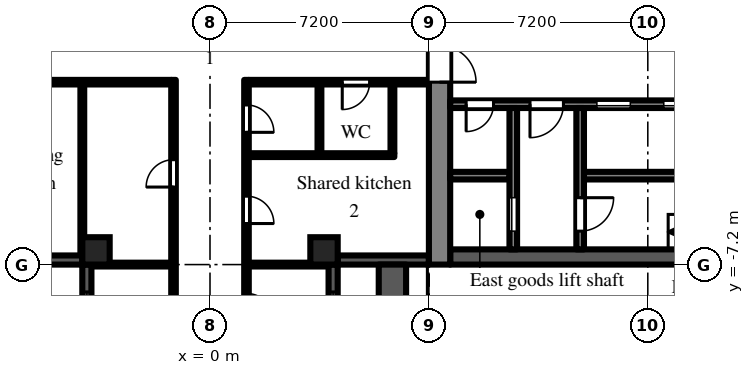
"""IFC4 building model, lengths in metres.
Left out: names, types, materials, properties, quantities, classifications, styles, units other than length and angle.
Written with IfcOpenShell. Run it as: python <this file> out.ifc"""

import sys

from ifc_helpers import new_model, si_unit, direction, frame, frame_2d, origin, origin_2d, place, context, subcontext, project, spatial, rectangle, extrude, element, fill, save


model = new_model("IFC4")
c1 = context("Model", 3, precision=1e-05, world=origin(), true_north=direction((0.0, 1.0)))
c2 = subcontext(c1, "Body", "Model", "MODEL_VIEW")
j1 = project(units=[si_unit("LENGTHUNIT", "METRE"), si_unit("PLANEANGLEUNIT", "RADIAN")], contexts=[c1])
p1 = place(None, origin())
s1 = spatial("IfcSite", under=j1, at=p1, CompositionType="ELEMENT")
p2 = place(p1, origin())
s2 = spatial("IfcBuilding", under=s1, at=p2, CompositionType="ELEMENT")
p3 = place(p2, frame((0.0, 0.0, 11.7)))
s3 = spatial("IfcBuildingStorey", under=s2, at=p3, CompositionType="ELEMENT", Elevation=11.7)
for number, where, z_axis, x_axis in (
    (1, (-3.75, -6.75, 0.0), (0.0, 0.0, 1.0), (1.0, 0.0, 0.0)),
    (2, (3.75, -6.75, 0.0), (0.0, 0.0, 1.0), (1.0, 0.0, 0.0)),
):
    element("IfcColumn", number, at=place(p3, frame(where, z_axis=z_axis, x_axis=x_axis)), inside=s3, PredefinedType="COLUMN", context=c2, shape_type="SweptSolid", body=[
        extrude(rectangle(XDim=0.9, YDim=0.9, at=origin_2d()), origin(), (0.0, 0.0, 1.0), 3.0),
    ])
p4 = place(p3, frame((-7.2, -7.05, 0.0), z_axis=(0.0, 0.0, 1.0), x_axis=(1.0, 0.0, 0.0)))
e3 = element("IfcWall", 3, at=p4, inside=s3, PredefinedType="SOLIDWALL", context=c2, shape_type="SweptSolid", body=[
    extrude(rectangle(XDim=3.0, YDim=0.3, at=frame_2d((1.5, 0.0))), origin(), (0.0, 0.0, 1.0), 2.1),
])
p5 = place(p3, frame((-4.05, -7.2, 0.0), z_axis=(0.0, 0.0, 1.0), x_axis=(0.0, -1.0, 0.0)))
e4 = element("IfcWall", 4, at=p5, inside=s3, PredefinedType="SOLIDWALL", context=c2, shape_type="SweptSolid", body=[
    extrude(rectangle(XDim=7.2, YDim=0.3, at=frame_2d((3.6, 0.0))), origin(), (0.0, 0.0, 1.0), 2.1),
])
p6 = place(p5, frame((3.0, 0.0, 0.0)))
e5 = element("IfcOpeningElement", 5, at=p6, cuts=e4, PredefinedType="OPENING", context=c2, shape_type="SweptSolid", body=[
    extrude(rectangle(XDim=1.2, YDim=2.05, at=frame_2d((0.6, 1.025))), frame((0.0, 0.16, 0.0), z_axis=(0.0, -1.0, 0.0), x_axis=(1.0, 0.0, 0.0)), (0.0, 0.0, 1.0), 0.32),
])
p7 = place(p5, frame((0.9, 0.0, 0.2)))
e6 = element("IfcOpeningElement", 6, at=p7, cuts=e4, PredefinedType="OPENING", context=c2, shape_type="SweptSolid", body=[
    extrude(rectangle(XDim=1.8, YDim=1.85, at=frame_2d((0.9, 0.925))), frame((0.0, 0.16, 0.0), z_axis=(0.0, -1.0, 0.0), x_axis=(1.0, 0.0, 0.0)), (0.0, 0.0, 1.0), 0.32),
])
p8 = place(p5, frame((4.5, 0.0, 0.2)))
e7 = element("IfcOpeningElement", 7, at=p8, cuts=e4, PredefinedType="OPENING", context=c2, shape_type="SweptSolid", body=[
    extrude(rectangle(XDim=1.8, YDim=1.85, at=frame_2d((0.9, 0.925))), frame((0.0, 0.16, 0.0), z_axis=(0.0, -1.0, 0.0), x_axis=(1.0, 0.0, 0.0)), (0.0, 0.0, 1.0), 0.32),
])
p9 = place(p3, frame((4.05, -14.4, 0.0), z_axis=(0.0, 0.0, 1.0), x_axis=(0.0, 1.0, 0.0)))
e8 = element("IfcWall", 8, at=p9, inside=s3, PredefinedType="SOLIDWALL", context=c2, shape_type="SweptSolid", body=[
    extrude(rectangle(XDim=7.2, YDim=0.3, at=frame_2d((3.6, 0.0))), origin(), (0.0, 0.0, 1.0), 2.1),
])
p10 = place(p9, frame((3.0, 0.0, 0.0)))
e9 = element("IfcOpeningElement", 9, at=p10, cuts=e8, PredefinedType="OPENING", context=c2, shape_type="SweptSolid", body=[
    extrude(rectangle(XDim=1.2, YDim=2.05, at=frame_2d((0.6, 1.025))), frame((0.0, 0.16, 0.0), z_axis=(0.0, -1.0, 0.0), x_axis=(1.0, 0.0, 0.0)), (0.0, 0.0, 1.0), 0.32),
])
p11 = place(p9, frame((0.9, 0.0, 0.2)))
e10 = element("IfcOpeningElement", 10, at=p11, cuts=e8, PredefinedType="OPENING", context=c2, shape_type="SweptSolid", body=[
    extrude(rectangle(XDim=1.8, YDim=1.85, at=frame_2d((0.9, 0.925))), frame((0.0, 0.16, 0.0), z_axis=(0.0, -1.0, 0.0), x_axis=(1.0, 0.0, 0.0)), (0.0, 0.0, 1.0), 0.32),
])
p12 = place(p9, frame((4.5, 0.0, 0.2)))
e11 = element("IfcOpeningElement", 11, at=p12, cuts=e8, PredefinedType="OPENING", context=c2, shape_type="SweptSolid", body=[
    extrude(rectangle(XDim=1.8, YDim=1.85, at=frame_2d((0.9, 0.925))), frame((0.0, 0.16, 0.0), z_axis=(0.0, -1.0, 0.0), x_axis=(1.0, 0.0, 0.0)), (0.0, 0.0, 1.0), 0.32),
])
p13 = place(p3, frame((4.2, -7.05, 0.0), z_axis=(0.0, 0.0, 1.0), x_axis=(1.0, 0.0, 0.0)))
e12 = element("IfcWall", 12, at=p13, inside=s3, PredefinedType="SOLIDWALL", context=c2, shape_type="SweptSolid", body=[
    extrude(rectangle(XDim=3.0, YDim=0.3, at=frame_2d((1.5, 0.0))), origin(), (0.0, 0.0, 1.0), 2.1),
])
p14 = place(p3, frame((6.0, -14.4, 0.0), z_axis=(0.0, 0.0, 1.0), x_axis=(0.0, 1.0, 0.0)))
e13 = element("IfcWall", 13, at=p14, inside=s3, PredefinedType="PARAPET", context=c2, shape_type="SweptSolid", body=[
    extrude(rectangle(XDim=7.2, YDim=0.9, at=frame_2d((3.6, 0.0))), origin(), (0.0, 0.0, 1.0), 0.8),
])
p15 = place(p3, frame((7.55, -7.2, 0.0), z_axis=(0.0, 0.0, 1.0), x_axis=(0.0, 1.0, 0.0)))
e14 = element("IfcWall", 14, at=p15, inside=s3, PredefinedType="SHEAR", context=c2, shape_type="SweptSolid", body=[
    extrude(rectangle(XDim=14.4, YDim=0.7, at=frame_2d((7.2, 0.0))), origin(), (0.0, 0.0, 1.0), 2.575),
])
p16 = place(p15, frame((6.0, 0.0, 0.0)))
e15 = element("IfcOpeningElement", 15, at=p16, cuts=e14, PredefinedType="OPENING", context=c2, shape_type="SweptSolid", body=[
    extrude(rectangle(XDim=2.4, YDim=2.2, at=frame_2d((1.2, 1.1))), frame((0.0, 0.36, 0.0), z_axis=(0.0, -1.0, 0.0), x_axis=(1.0, 0.0, 0.0)), (0.0, 0.0, 1.0), 0.72),
])
p17 = place(p3, frame((7.9, -6.95, 0.0), z_axis=(0.0, 0.0, 1.0), x_axis=(1.0, 0.0, 0.0)))
e16 = element("IfcWall", 16, at=p17, inside=s3, PredefinedType="SHEAR", context=c2, shape_type="SweptSolid", body=[
    extrude(rectangle(XDim=12.95, YDim=0.5, at=frame_2d((6.475, 0.0))), origin(), (0.0, 0.0, 1.0), 2.575),
])
p18 = place(p3, frame((7.9, -1.925, 0.0), z_axis=(0.0, 0.0, 1.0), x_axis=(1.0, 0.0, 0.0)))
e17 = element("IfcWall", 17, at=p18, inside=s3, PredefinedType="SHEAR", context=c2, shape_type="SweptSolid", body=[
    extrude(rectangle(XDim=12.95, YDim=0.25, at=frame_2d((6.475, 0.0))), origin(), (0.0, 0.0, 1.0), 2.575),
])
p19 = place(p18, frame((4.825, 0.0, 0.0)))
e18 = element("IfcOpeningElement", 18, at=p19, cuts=e17, PredefinedType="OPENING", context=c2, shape_type="SweptSolid", body=[
    extrude(rectangle(XDim=1.1, YDim=2.1, at=frame_2d((0.55, 1.05))), frame((0.0, 0.135, 0.0), z_axis=(0.0, -1.0, 0.0), x_axis=(1.0, 0.0, 0.0)), (0.0, 0.0, 1.0), 0.27),
])
p20 = place(p18, frame((7.025, 0.0, 0.0)))
e19 = element("IfcOpeningElement", 19, at=p20, cuts=e17, PredefinedType="OPENING", context=c2, shape_type="SweptSolid", body=[
    extrude(rectangle(XDim=1.1, YDim=2.1, at=frame_2d((0.55, 1.05))), frame((0.0, 0.135, 0.0), z_axis=(0.0, -1.0, 0.0), x_axis=(1.0, 0.0, 0.0)), (0.0, 0.0, 1.0), 0.27),
])
p21 = place(p18, frame((9.225, 0.0, 0.0)))
e20 = element("IfcOpeningElement", 20, at=p21, cuts=e17, PredefinedType="OPENING", context=c2, shape_type="SweptSolid", body=[
    extrude(rectangle(XDim=1.1, YDim=2.1, at=frame_2d((0.55, 1.05))), frame((0.0, 0.135, 0.0), z_axis=(0.0, -1.0, 0.0), x_axis=(1.0, 0.0, 0.0)), (0.0, 0.0, 1.0), 0.27),
])
p22 = place(p18, frame((0.525, 0.0, 0.0)))
e21 = element("IfcOpeningElement", 21, at=p22, cuts=e17, PredefinedType="OPENING", context=c2, shape_type="SweptSolid", body=[
    extrude(rectangle(XDim=0.9, YDim=2.1, at=frame_2d((0.45, 1.05))), frame((0.0, 0.135, 0.0), z_axis=(0.0, -1.0, 0.0), x_axis=(1.0, 0.0, 0.0)), (0.0, 0.0, 1.0), 0.27),
])
p23 = place(p18, frame((2.625, 0.0, 0.0)))
e22 = element("IfcOpeningElement", 22, at=p23, cuts=e17, PredefinedType="OPENING", context=c2, shape_type="SweptSolid", body=[
    extrude(rectangle(XDim=1.1, YDim=2.1, at=frame_2d((0.55, 1.05))), frame((0.0, 0.135, 0.0), z_axis=(0.0, -1.0, 0.0), x_axis=(1.0, 0.0, 0.0)), (0.0, 0.0, 1.0), 0.27),
])
p24 = place(p3, frame((7.9, -4.275, 0.0), z_axis=(0.0, 0.0, 1.0), x_axis=(1.0, 0.0, 0.0)))
e23 = element("IfcWall", 23, at=p24, inside=s3, PredefinedType="SHEAR", context=c2, shape_type="SweptSolid", body=[
    extrude(rectangle(XDim=1.95, YDim=0.25, at=frame_2d((0.975, 0.0))), origin(), (0.0, 0.0, 1.0), 2.575),
])
p25 = place(p3, frame((12.3, -4.275, 0.0), z_axis=(0.0, 0.0, 1.0), x_axis=(1.0, 0.0, 0.0)))
e24 = element("IfcWall", 24, at=p25, inside=s3, PredefinedType="SHEAR", context=c2, shape_type="SweptSolid", body=[
    extrude(rectangle(XDim=8.55, YDim=0.25, at=frame_2d((4.275, 0.0))), origin(), (0.0, 0.0, 1.0), 2.575),
])
p26 = place(p3, frame((9.975, -2.05, 0.0), z_axis=(0.0, 0.0, 1.0), x_axis=(0.0, -1.0, 0.0)))
e25 = element("IfcWall", 25, at=p26, inside=s3, PredefinedType="SHEAR", context=c2, shape_type="SweptSolid", body=[
    extrude(rectangle(XDim=4.65, YDim=0.25, at=frame_2d((2.325, 0.0))), origin(), (0.0, 0.0, 1.0), 2.575),
])
p27 = place(p26, frame((2.95, 0.0, 0.0)))
e26 = element("IfcOpeningElement", 26, at=p27, cuts=e25, PredefinedType="OPENING", context=c2, shape_type="SweptSolid", body=[
    extrude(rectangle(XDim=1.1, YDim=2.1, at=frame_2d((0.55, 1.05))), frame((0.0, 0.135, 0.0), z_axis=(0.0, -1.0, 0.0), x_axis=(1.0, 0.0, 0.0)), (0.0, 0.0, 1.0), 0.27),
])
p28 = place(p3, frame((12.175, -2.05, 0.0), z_axis=(0.0, 0.0, 1.0), x_axis=(0.0, -1.0, 0.0)))
e27 = element("IfcWall", 27, at=p28, inside=s3, PredefinedType="SHEAR", context=c2, shape_type="SweptSolid", body=[
    extrude(rectangle(XDim=4.65, YDim=0.25, at=frame_2d((2.325, 0.0))), origin(), (0.0, 0.0, 1.0), 2.575),
])
p29 = place(p28, frame((2.95, 0.0, 0.0)))
e28 = element("IfcOpeningElement", 28, at=p29, cuts=e27, PredefinedType="OPENING", context=c2, shape_type="SweptSolid", body=[
    extrude(rectangle(XDim=1.1, YDim=2.1, at=frame_2d((0.55, 1.05))), frame((0.0, 0.135, 0.0), z_axis=(0.0, -1.0, 0.0), x_axis=(1.0, 0.0, 0.0)), (0.0, 0.0, 1.0), 0.27),
])
p30 = place(p3, frame((-7.2, -1.2, 0.0), z_axis=(0.0, 0.0, 1.0), x_axis=(1.0, 0.0, 0.0)))
e29 = element("IfcWall", 29, at=p30, inside=s3, PredefinedType="PARTITIONING", context=c2, shape_type="SweptSolid", body=[
    extrude(rectangle(XDim=5.925, YDim=0.15, at=frame_2d((2.962, 0.0))), origin(), (0.0, 0.0, 1.0), 2.575),
])
p31 = place(p30, frame((1.05, 0.0, 0.0)))
e30 = element("IfcOpeningElement", 30, at=p31, cuts=e29, PredefinedType="OPENING", context=c2, shape_type="SweptSolid", body=[
    extrude(rectangle(XDim=0.9, YDim=2.1, at=frame_2d((0.45, 1.05))), frame((0.0, 0.085, 0.0), z_axis=(0.0, -1.0, 0.0), x_axis=(1.0, 0.0, 0.0)), (0.0, 0.0, 1.0), 0.17),
])
p32 = place(p3, frame((-4.2, -6.9, 0.0), z_axis=(0.0, 0.0, 1.0), x_axis=(0.0, 1.0, 0.0)))
e31 = element("IfcWall", 31, at=p32, inside=s3, PredefinedType="PARTITIONING", context=c2, shape_type="SweptSolid", body=[
    extrude(rectangle(XDim=5.625, YDim=0.125, at=frame_2d((2.812, 0.0))), origin(), (0.0, 0.0, 1.0), 2.575),
])
p33 = place(p3, frame((-3.9, -7.2, 0.0), z_axis=(0.0, 0.0, 1.0), x_axis=(1.0, 0.0, 0.0)))
e32 = element("IfcWall", 32, at=p33, inside=s3, PredefinedType="PARTITIONING", context=c2, shape_type="SweptSolid", body=[
    extrude(rectangle(XDim=2.625, YDim=0.125, at=frame_2d((1.312, 0.0))), origin(), (0.0, 0.0, 1.0), 2.575),
])
p34 = place(p3, frame((-1.2, -36.5, 0.0), z_axis=(0.0, 0.0, 1.0), x_axis=(0.0, 1.0, 0.0)))
e33 = element("IfcWall", 33, at=p34, inside=s3, PredefinedType="PARTITIONING", context=c2, shape_type="SweptSolid", body=[
    extrude(rectangle(XDim=35.375, YDim=0.15, at=frame_2d((17.688, 0.0))), origin(), (0.0, 0.0, 1.0), 2.575),
])
p35 = place(p34, frame((31.85, 0.0, 0.0)))
e34 = element("IfcOpeningElement", 34, at=p35, cuts=e33, PredefinedType="OPENING", context=c2, shape_type="SweptSolid", body=[
    extrude(rectangle(XDim=0.9, YDim=2.1, at=frame_2d((0.45, 1.05))), frame((0.0, 0.085, 0.0), z_axis=(0.0, -1.0, 0.0), x_axis=(1.0, 0.0, 0.0)), (0.0, 0.0, 1.0), 0.17),
])
p36 = place(p34, frame((27.05, 0.0, 0.0)))
e35 = element("IfcOpeningElement", 35, at=p36, cuts=e33, PredefinedType="OPENING", context=c2, shape_type="SweptSolid", body=[
    extrude(rectangle(XDim=0.9, YDim=2.1, at=frame_2d((0.45, 1.05))), frame((0.0, 0.085, 0.0), z_axis=(0.0, -1.0, 0.0), x_axis=(1.0, 0.0, 0.0)), (0.0, 0.0, 1.0), 0.17),
])
p37 = place(p34, frame((1.55, 0.0, 0.0)))
e36 = element("IfcOpeningElement", 36, at=p37, cuts=e33, PredefinedType="OPENING", context=c2, shape_type="SweptSolid", body=[
    extrude(rectangle(XDim=1.0, YDim=2.1, at=frame_2d((0.5, 1.05))), frame((0.0, 0.085, 0.0), z_axis=(0.0, -1.0, 0.0), x_axis=(1.0, 0.0, 0.0)), (0.0, 0.0, 1.0), 0.17),
])
p38 = place(p3, frame((1.2, -36.5, 0.0), z_axis=(0.0, 0.0, 1.0), x_axis=(0.0, 1.0, 0.0)))
e37 = element("IfcWall", 37, at=p38, inside=s3, PredefinedType="PARTITIONING", context=c2, shape_type="SweptSolid", body=[
    extrude(rectangle(XDim=35.375, YDim=0.15, at=frame_2d((17.688, 0.0))), origin(), (0.0, 0.0, 1.0), 2.575),
])
p39 = place(p38, frame((33.65, 0.0, 0.0)))
e38 = element("IfcOpeningElement", 38, at=p39, cuts=e37, PredefinedType="OPENING", context=c2, shape_type="SweptSolid", body=[
    extrude(rectangle(XDim=0.9, YDim=2.1, at=frame_2d((0.45, 1.05))), frame((0.0, 0.085, 0.0), z_axis=(0.0, -1.0, 0.0), x_axis=(1.0, 0.0, 0.0)), (0.0, 0.0, 1.0), 0.17),
])
p40 = place(p38, frame((30.65, 0.0, 0.0)))
e39 = element("IfcOpeningElement", 39, at=p40, cuts=e37, PredefinedType="OPENING", context=c2, shape_type="SweptSolid", body=[
    extrude(rectangle(XDim=0.9, YDim=2.1, at=frame_2d((0.45, 1.05))), frame((0.0, 0.085, 0.0), z_axis=(0.0, -1.0, 0.0), x_axis=(1.0, 0.0, 0.0)), (0.0, 0.0, 1.0), 0.17),
])
p41 = place(p38, frame((27.45, 0.0, 0.0)))
e40 = element("IfcOpeningElement", 40, at=p41, cuts=e37, PredefinedType="OPENING", context=c2, shape_type="SweptSolid", body=[
    extrude(rectangle(XDim=0.9, YDim=2.1, at=frame_2d((0.45, 1.05))), frame((0.0, 0.085, 0.0), z_axis=(0.0, -1.0, 0.0), x_axis=(1.0, 0.0, 0.0)), (0.0, 0.0, 1.0), 0.17),
])
p42 = place(p38, frame((23.85, 0.0, 0.0)))
e41 = element("IfcOpeningElement", 41, at=p42, cuts=e37, PredefinedType="OPENING", context=c2, shape_type="SweptSolid", body=[
    extrude(rectangle(XDim=0.9, YDim=2.1, at=frame_2d((0.45, 1.05))), frame((0.0, 0.085, 0.0), z_axis=(0.0, -1.0, 0.0), x_axis=(1.0, 0.0, 0.0)), (0.0, 0.0, 1.0), 0.17),
])
p43 = place(p38, frame((19.85, 0.0, 0.0)))
e42 = element("IfcOpeningElement", 42, at=p43, cuts=e37, PredefinedType="OPENING", context=c2, shape_type="SweptSolid", body=[
    extrude(rectangle(XDim=0.9, YDim=2.1, at=frame_2d((0.45, 1.05))), frame((0.0, 0.085, 0.0), z_axis=(0.0, -1.0, 0.0), x_axis=(1.0, 0.0, 0.0)), (0.0, 0.0, 1.0), 0.17),
])
p44 = place(p38, frame((1.55, 0.0, 0.0)))
e43 = element("IfcOpeningElement", 43, at=p44, cuts=e37, PredefinedType="OPENING", context=c2, shape_type="SweptSolid", body=[
    extrude(rectangle(XDim=1.0, YDim=2.1, at=frame_2d((0.5, 1.05))), frame((0.0, 0.085, 0.0), z_axis=(0.0, -1.0, 0.0), x_axis=(1.0, 0.0, 0.0)), (0.0, 0.0, 1.0), 0.17),
])
p45 = place(p3, frame((1.275, -7.2, 0.0), z_axis=(0.0, 0.0, 1.0), x_axis=(1.0, 0.0, 0.0)))
e44 = element("IfcWall", 44, at=p45, inside=s3, PredefinedType="PARTITIONING", context=c2, shape_type="SweptSolid", body=[
    extrude(rectangle(XDim=2.625, YDim=0.125, at=frame_2d((1.312, 0.0))), origin(), (0.0, 0.0, 1.0), 2.575),
])
p46 = place(p3, frame((1.275, -3.6, 0.0), z_axis=(0.0, 0.0, 1.0), x_axis=(1.0, 0.0, 0.0)))
e45 = element("IfcWall", 45, at=p46, inside=s3, PredefinedType="PARTITIONING", context=c2, shape_type="SweptSolid", body=[
    extrude(rectangle(XDim=4.788, YDim=0.125, at=frame_2d((2.394, 0.0))), origin(), (0.0, 0.0, 1.0), 2.575),
])
p47 = place(p3, frame((1.275, -1.2, 0.0), z_axis=(0.0, 0.0, 1.0), x_axis=(1.0, 0.0, 0.0)))
e46 = element("IfcWall", 46, at=p47, inside=s3, PredefinedType="PARTITIONING", context=c2, shape_type="SweptSolid", body=[
    extrude(rectangle(XDim=5.925, YDim=0.15, at=frame_2d((2.962, 0.0))), origin(), (0.0, 0.0, 1.0), 2.575),
])
p48 = place(p47, frame((3.075, 0.0, 0.0)))
e47 = element("IfcOpeningElement", 47, at=p48, cuts=e46, PredefinedType="OPENING", context=c2, shape_type="SweptSolid", body=[
    extrude(rectangle(XDim=0.9, YDim=2.1, at=frame_2d((0.45, 1.05))), frame((0.0, 0.085, 0.0), z_axis=(0.0, -1.0, 0.0), x_axis=(1.0, 0.0, 0.0)), (0.0, 0.0, 1.0), 0.17),
])
for number, where, z_axis, x_axis in (
    (48, (3.6, -3.538, 0.0), (0.0, 0.0, 1.0), (0.0, 1.0, 0.0)),
    (49, (6.0, -3.538, 0.0), (0.0, 0.0, 1.0), (0.0, 1.0, 0.0)),
):
    element("IfcWall", number, at=place(p3, frame(where, z_axis=z_axis, x_axis=x_axis)), inside=s3, PredefinedType="PARTITIONING", context=c2, shape_type="SweptSolid", body=[
        extrude(rectangle(XDim=2.263, YDim=0.125, at=frame_2d((1.131, 0.0))), origin(), (0.0, 0.0, 1.0), 2.575),
    ])
p49 = place(p7, origin())
e50 = element("IfcWindow", 50, at=p49, inside=s3, PartitioningType="SINGLE_PANEL", PredefinedType="WINDOW", context=c2, shape_type="SweptSolid", body=[
    extrude(rectangle(XDim=1.8, YDim=1.85, at=frame_2d((0.9, 0.925))), frame((0.0, 0.03, 0.0), z_axis=(0.0, -1.0, 0.0), x_axis=(1.0, 0.0, 0.0)), (0.0, 0.0, 1.0), 0.06),
])
fill(e6, e50)
p50 = place(p12, origin())
e51 = element("IfcWindow", 51, at=p50, inside=s3, PartitioningType="SINGLE_PANEL", PredefinedType="WINDOW", context=c2, shape_type="SweptSolid", body=[
    extrude(rectangle(XDim=1.8, YDim=1.85, at=frame_2d((0.9, 0.925))), frame((0.0, 0.03, 0.0), z_axis=(0.0, -1.0, 0.0), x_axis=(1.0, 0.0, 0.0)), (0.0, 0.0, 1.0), 0.06),
])
fill(e11, e51)
p51 = place(p19, origin())
e52 = element("IfcDoor", 52, at=p51, inside=s3, OperationType="SLIDING_TO_LEFT", PredefinedType="DOOR", context=c2, shape_type="SweptSolid", body=[
    extrude(rectangle(XDim=1.1, YDim=2.1, at=frame_2d((0.55, 1.05))), frame((0.0, 0.025, 0.0), z_axis=(0.0, -1.0, 0.0), x_axis=(1.0, 0.0, 0.0)), (0.0, 0.0, 1.0), 0.05),
])
fill(e18, e52)
p52 = place(p20, origin())
e53 = element("IfcDoor", 53, at=p52, inside=s3, OperationType="SLIDING_TO_LEFT", PredefinedType="DOOR", context=c2, shape_type="SweptSolid", body=[
    extrude(rectangle(XDim=1.1, YDim=2.1, at=frame_2d((0.55, 1.05))), frame((0.0, 0.025, 0.0), z_axis=(0.0, -1.0, 0.0), x_axis=(1.0, 0.0, 0.0)), (0.0, 0.0, 1.0), 0.05),
])
fill(e19, e53)
p53 = place(p27, origin())
e54 = element("IfcDoor", 54, at=p53, inside=s3, OperationType="SLIDING_TO_LEFT", PredefinedType="DOOR", context=c2, shape_type="SweptSolid", body=[
    extrude(rectangle(XDim=1.1, YDim=2.1, at=frame_2d((0.55, 1.05))), frame((0.0, 0.025, 0.0), z_axis=(0.0, -1.0, 0.0), x_axis=(1.0, 0.0, 0.0)), (0.0, 0.0, 1.0), 0.05),
])
fill(e26, e54)
p54 = place(p29, origin())
e55 = element("IfcDoor", 55, at=p54, inside=s3, OperationType="SINGLE_SWING_LEFT", PredefinedType="DOOR", context=c2, shape_type="SweptSolid", body=[
    extrude(rectangle(XDim=1.1, YDim=2.1, at=frame_2d((0.55, 1.05))), frame((0.0, 0.025, 0.0), z_axis=(0.0, -1.0, 0.0), x_axis=(1.0, 0.0, 0.0)), (0.0, 0.0, 1.0), 0.05),
])
fill(e28, e55)
p55 = place(p22, frame((0.9, 0.0, 0.0), z_axis=(0.0, 0.0, 1.0), x_axis=(-1.0, 0.0, 0.0)))
e56 = element("IfcDoor", 56, at=p55, inside=s3, OperationType="SINGLE_SWING_RIGHT", PredefinedType="DOOR", context=c2, shape_type="SweptSolid", body=[
    extrude(rectangle(XDim=0.9, YDim=2.1, at=frame_2d((0.45, 1.05))), frame((0.0, 0.025, 0.0), z_axis=(0.0, -1.0, 0.0), x_axis=(1.0, 0.0, 0.0)), (0.0, 0.0, 1.0), 0.05),
])
fill(e21, e56)
p56 = place(p23, frame((1.1, 0.0, 0.0), z_axis=(0.0, 0.0, 1.0), x_axis=(-1.0, 0.0, 0.0)))
e57 = element("IfcDoor", 57, at=p56, inside=s3, OperationType="SINGLE_SWING_RIGHT", PredefinedType="DOOR", context=c2, shape_type="SweptSolid", body=[
    extrude(rectangle(XDim=1.1, YDim=2.1, at=frame_2d((0.55, 1.05))), frame((0.0, 0.025, 0.0), z_axis=(0.0, -1.0, 0.0), x_axis=(1.0, 0.0, 0.0)), (0.0, 0.0, 1.0), 0.05),
])
fill(e22, e57)
p57 = place(p16, frame((2.4, 0.0, 0.0), z_axis=(0.0, 0.0, 1.0), x_axis=(-1.0, 0.0, 0.0)))
e58 = element("IfcDoor", 58, at=p57, inside=s3, OperationType="DOUBLE_DOOR_DOUBLE_SWING", PredefinedType="DOOR", context=c2, shape_type="SweptSolid", body=[
    extrude(rectangle(XDim=2.4, YDim=2.2, at=frame_2d((1.2, 1.1))), frame((0.0, 0.025, 0.0), z_axis=(0.0, -1.0, 0.0), x_axis=(1.0, 0.0, 0.0)), (0.0, 0.0, 1.0), 0.05),
])
fill(e15, e58)
p58 = place(p39, frame((0.9, 0.0, 0.0), z_axis=(0.0, 0.0, 1.0), x_axis=(-1.0, 0.0, 0.0)))
e59 = element("IfcDoor", 59, at=p58, inside=s3, OperationType="SINGLE_SWING_RIGHT", PredefinedType="DOOR", context=c2, shape_type="SweptSolid", body=[
    extrude(rectangle(XDim=0.9, YDim=2.1, at=frame_2d((0.45, 1.05))), frame((0.0, 0.025, 0.0), z_axis=(0.0, -1.0, 0.0), x_axis=(1.0, 0.0, 0.0)), (0.0, 0.0, 1.0), 0.05),
])
fill(e38, e59)
p59 = place(p48, frame((0.9, 0.0, 0.0), z_axis=(0.0, 0.0, 1.0), x_axis=(-1.0, 0.0, 0.0)))
e60 = element("IfcDoor", 60, at=p59, inside=s3, OperationType="SINGLE_SWING_RIGHT", PredefinedType="DOOR", context=c2, shape_type="SweptSolid", body=[
    extrude(rectangle(XDim=0.9, YDim=2.1, at=frame_2d((0.45, 1.05))), frame((0.0, 0.025, 0.0), z_axis=(0.0, -1.0, 0.0), x_axis=(1.0, 0.0, 0.0)), (0.0, 0.0, 1.0), 0.05),
])
fill(e47, e60)
p60 = place(p40, frame((0.9, 0.0, 0.0), z_axis=(0.0, 0.0, 1.0), x_axis=(-1.0, 0.0, 0.0)))
e61 = element("IfcDoor", 61, at=p60, inside=s3, OperationType="SINGLE_SWING_RIGHT", PredefinedType="DOOR", context=c2, shape_type="SweptSolid", body=[
    extrude(rectangle(XDim=0.9, YDim=2.1, at=frame_2d((0.45, 1.05))), frame((0.0, 0.025, 0.0), z_axis=(0.0, -1.0, 0.0), x_axis=(1.0, 0.0, 0.0)), (0.0, 0.0, 1.0), 0.05),
])
fill(e39, e61)
p61 = place(p35, origin())
e62 = element("IfcDoor", 62, at=p61, inside=s3, OperationType="SINGLE_SWING_LEFT", PredefinedType="DOOR", context=c2, shape_type="SweptSolid", body=[
    extrude(rectangle(XDim=0.9, YDim=2.1, at=frame_2d((0.45, 1.05))), frame((0.0, 0.025, 0.0), z_axis=(0.0, -1.0, 0.0), x_axis=(1.0, 0.0, 0.0)), (0.0, 0.0, 1.0), 0.05),
])
fill(e34, e62)
p62 = place(p41, frame((0.9, 0.0, 0.0), z_axis=(0.0, 0.0, 1.0), x_axis=(-1.0, 0.0, 0.0)))
e63 = element("IfcDoor", 63, at=p62, inside=s3, OperationType="SINGLE_SWING_RIGHT", PredefinedType="DOOR", context=c2, shape_type="SweptSolid", body=[
    extrude(rectangle(XDim=0.9, YDim=2.1, at=frame_2d((0.45, 1.05))), frame((0.0, 0.025, 0.0), z_axis=(0.0, -1.0, 0.0), x_axis=(1.0, 0.0, 0.0)), (0.0, 0.0, 1.0), 0.05),
])
fill(e40, e63)
save(model, sys.argv[1])
